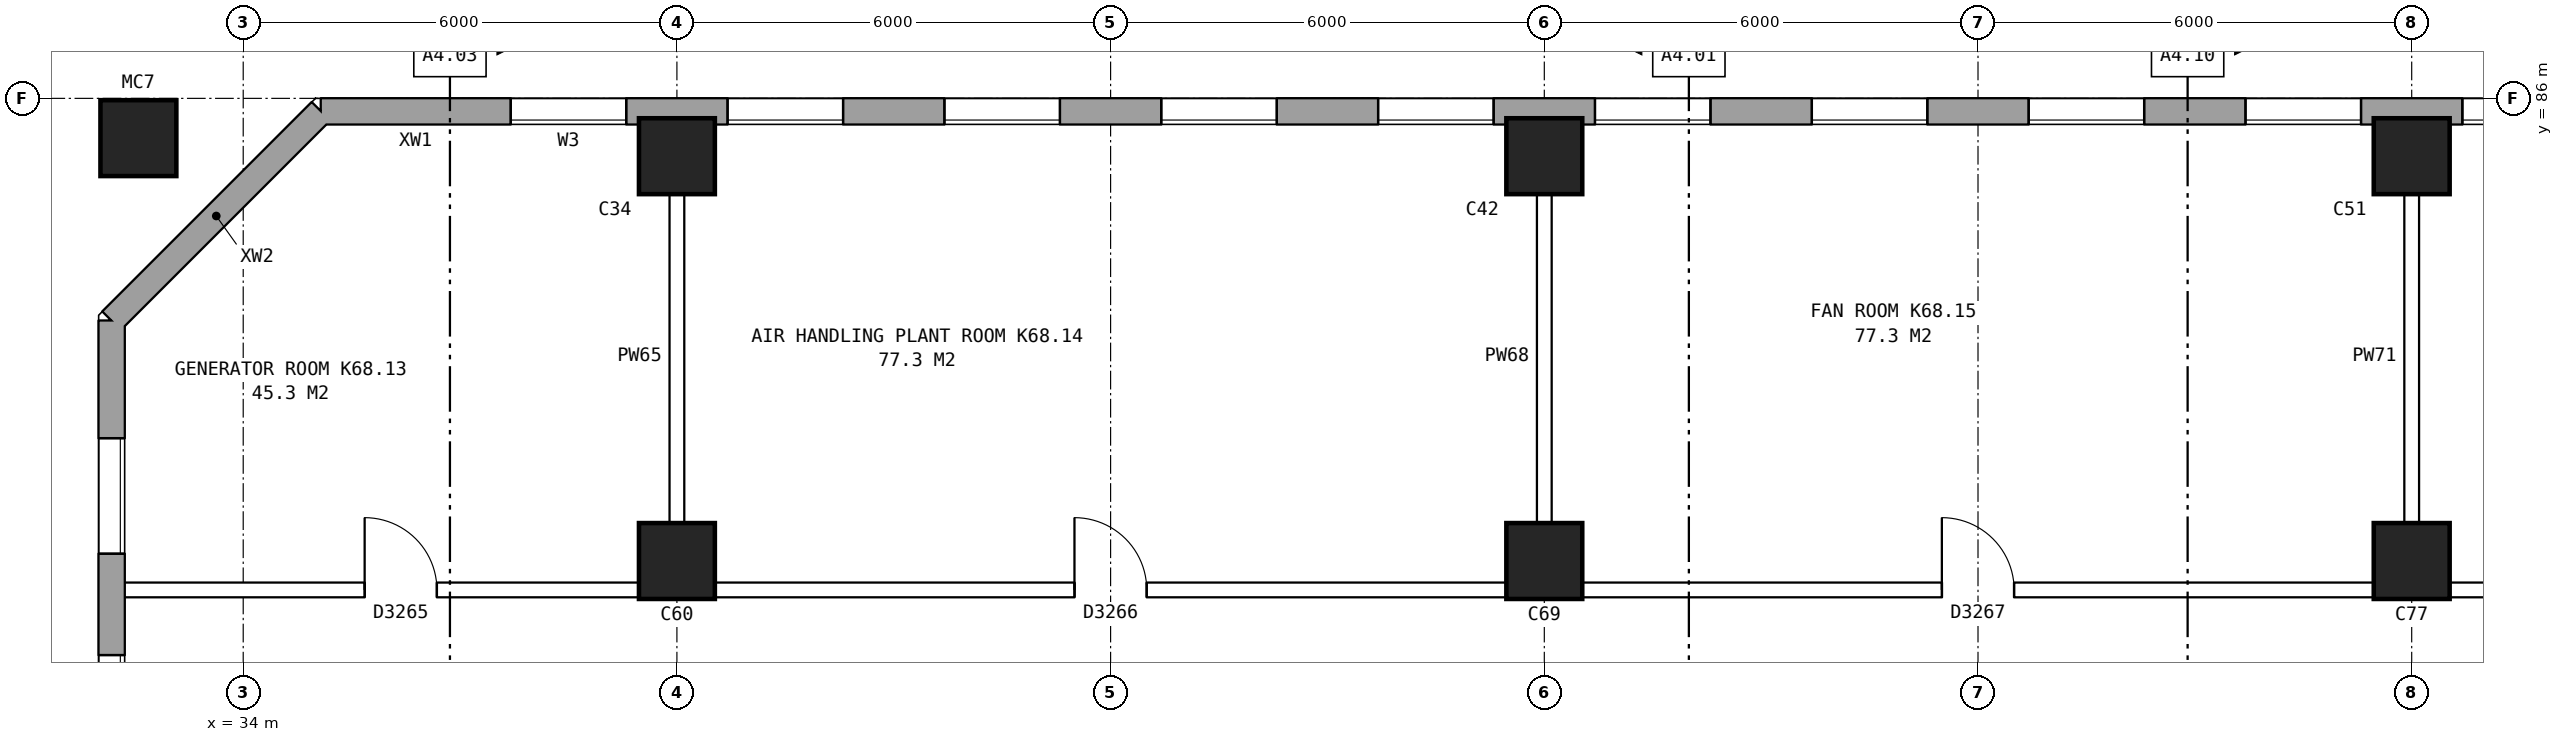
"""IFC4 building model, lengths in metres.
Left out: names, types, materials, properties, quantities, classifications, styles, units other than length and angle.
Written with IfcOpenShell. Run it as: python <this file> out.ifc"""

import sys

from ifc_helpers import new_model, si_unit, direction, frame, frame_2d, origin, origin_2d, place, context, subcontext, project, spatial, polyline, rectangle, hollow_rectangle, outline, extrude, element, fill, save


model = new_model("IFC4")
c1 = context("Model", 3, precision=1e-05, world=origin(), true_north=direction((0.0, 1.0)))
c2 = subcontext(c1, "Body", "Model", "MODEL_VIEW")
j1 = project(units=[si_unit("LENGTHUNIT", "METRE"), si_unit("PLANEANGLEUNIT", "RADIAN")], contexts=[c1])
p1 = place(None, origin())
s1 = spatial("IfcSite", under=j1, at=p1, CompositionType="ELEMENT")
p2 = place(p1, origin())
s2 = spatial("IfcBuilding", under=s1, at=p2, CompositionType="ELEMENT")
p3 = place(p2, frame((0.0, 0.0, 243.9)))
s3 = spatial("IfcBuildingStorey", under=s2, at=p3, CompositionType="ELEMENT", Elevation=243.9)
p4 = place(p3, frame((40.0, 79.6, 0.0), z_axis=(0.0, 0.0, 1.0), x_axis=(1.0, 0.0, 0.0)))
e1 = element("IfcColumn", 1, at=p4, inside=s3, PredefinedType="COLUMN", context=c2, shape_type="SweptSolid", body=[
    extrude(rectangle(XDim=1.05, YDim=1.05, at=origin_2d()), origin(), (0.0, 0.0, 1.0), 15.563),
])
p5 = place(p3, frame((40.0, 85.2, 0.0), z_axis=(0.0, 0.0, 1.0), x_axis=(1.0, 0.0, 0.0)))
e2 = element("IfcColumn", 2, at=p5, inside=s3, PredefinedType="COLUMN", context=c2, shape_type="SweptSolid", body=[
    extrude(rectangle(XDim=1.05, YDim=1.05, at=origin_2d()), origin(), (0.0, 0.0, 1.0), 18.363),
])
p6 = place(p3, frame((52.0, 79.6, 0.0), z_axis=(0.0, 0.0, 1.0), x_axis=(1.0, 0.0, 0.0)))
e3 = element("IfcColumn", 3, at=p6, inside=s3, PredefinedType="COLUMN", context=c2, shape_type="SweptSolid", body=[
    extrude(rectangle(XDim=1.05, YDim=1.05, at=origin_2d()), origin(), (0.0, 0.0, 1.0), 15.563),
])
p7 = place(p3, frame((52.0, 85.2, 0.0), z_axis=(0.0, 0.0, 1.0), x_axis=(1.0, 0.0, 0.0)))
e4 = element("IfcColumn", 4, at=p7, inside=s3, PredefinedType="COLUMN", context=c2, shape_type="SweptSolid", body=[
    extrude(rectangle(XDim=1.05, YDim=1.05, at=origin_2d()), origin(), (0.0, 0.0, 1.0), 18.363),
])
p8 = place(p3, frame((64.0, 79.6, 0.0), z_axis=(0.0, 0.0, 1.0), x_axis=(1.0, 0.0, 0.0)))
e5 = element("IfcColumn", 5, at=p8, inside=s3, PredefinedType="COLUMN", context=c2, shape_type="SweptSolid", body=[
    extrude(rectangle(XDim=1.05, YDim=1.05, at=origin_2d()), origin(), (0.0, 0.0, 1.0), 15.563),
])
p9 = place(p3, frame((64.0, 85.2, 0.0), z_axis=(0.0, 0.0, 1.0), x_axis=(1.0, 0.0, 0.0)))
e6 = element("IfcColumn", 6, at=p9, inside=s3, PredefinedType="COLUMN", context=c2, shape_type="SweptSolid", body=[
    extrude(rectangle(XDim=1.05, YDim=1.05, at=origin_2d()), origin(), (0.0, 0.0, 1.0), 18.363),
])
p10 = place(p3, frame((32.55, 85.45, 0.0), z_axis=(0.0, 0.0, 1.0), x_axis=(1.0, 0.0, 0.0)))
e7 = element("IfcColumn", 7, at=p10, inside=s3, PredefinedType="COLUMN", context=c2, shape_type="SweptSolid", body=[
    extrude(hollow_rectangle(XDim=1.05, YDim=1.05, WallThickness=0.053, at=origin_2d()), origin(), (0.0, 0.0, 1.0), 18.488),
])
p11 = place(p3, frame((74.925, 85.82, 0.0), z_axis=(0.0, 0.0, 1.0), x_axis=(-1.0, 0.0, 0.0)))
e8 = element("IfcWall", 8, at=p11, inside=s3, PredefinedType="STANDARD", context=c2, shape_type="SweptSolid", body=[
    extrude(rectangle(XDim=39.851, YDim=0.36, at=frame_2d((19.925, 0.0))), origin(), (0.0, 0.0, 1.0), 19.21),
])
p12 = place(p11, frame((35.625, 0.0, 1.5)))
e9 = element("IfcOpeningElement", 9, at=p12, cuts=e8, PredefinedType="OPENING", context=c2, shape_type="SweptSolid", body=[
    extrude(rectangle(XDim=1.6, YDim=1.2, at=frame_2d((0.8, 0.6))), frame((0.0, 0.19, 0.0), z_axis=(0.0, -1.0, 0.0), x_axis=(1.0, 0.0, 0.0)), (0.0, 0.0, 1.0), 0.38),
])
p13 = place(p11, frame((32.625, 0.0, 1.5)))
e10 = element("IfcOpeningElement", 10, at=p13, cuts=e8, PredefinedType="OPENING", context=c2, shape_type="SweptSolid", body=[
    extrude(rectangle(XDim=1.6, YDim=1.2, at=frame_2d((0.8, 0.6))), frame((0.0, 0.19, 0.0), z_axis=(0.0, -1.0, 0.0), x_axis=(1.0, 0.0, 0.0)), (0.0, 0.0, 1.0), 0.38),
])
p14 = place(p11, frame((29.625, 0.0, 1.5)))
e11 = element("IfcOpeningElement", 11, at=p14, cuts=e8, PredefinedType="OPENING", context=c2, shape_type="SweptSolid", body=[
    extrude(rectangle(XDim=1.6, YDim=1.2, at=frame_2d((0.8, 0.6))), frame((0.0, 0.19, 0.0), z_axis=(0.0, -1.0, 0.0), x_axis=(1.0, 0.0, 0.0)), (0.0, 0.0, 1.0), 0.38),
])
p15 = place(p11, frame((26.625, 0.0, 1.5)))
e12 = element("IfcOpeningElement", 12, at=p15, cuts=e8, PredefinedType="OPENING", context=c2, shape_type="SweptSolid", body=[
    extrude(rectangle(XDim=1.6, YDim=1.2, at=frame_2d((0.8, 0.6))), frame((0.0, 0.19, 0.0), z_axis=(0.0, -1.0, 0.0), x_axis=(1.0, 0.0, 0.0)), (0.0, 0.0, 1.0), 0.38),
])
p16 = place(p11, frame((23.625, 0.0, 1.5)))
e13 = element("IfcOpeningElement", 13, at=p16, cuts=e8, PredefinedType="OPENING", context=c2, shape_type="SweptSolid", body=[
    extrude(rectangle(XDim=1.6, YDim=1.2, at=frame_2d((0.8, 0.6))), frame((0.0, 0.19, 0.0), z_axis=(0.0, -1.0, 0.0), x_axis=(1.0, 0.0, 0.0)), (0.0, 0.0, 1.0), 0.38),
])
p17 = place(p11, frame((20.625, 0.0, 1.5)))
e14 = element("IfcOpeningElement", 14, at=p17, cuts=e8, PredefinedType="OPENING", context=c2, shape_type="SweptSolid", body=[
    extrude(rectangle(XDim=1.6, YDim=1.2, at=frame_2d((0.8, 0.6))), frame((0.0, 0.19, 0.0), z_axis=(0.0, -1.0, 0.0), x_axis=(1.0, 0.0, 0.0)), (0.0, 0.0, 1.0), 0.38),
])
p18 = place(p11, frame((17.625, 0.0, 1.5)))
e15 = element("IfcOpeningElement", 15, at=p18, cuts=e8, PredefinedType="OPENING", context=c2, shape_type="SweptSolid", body=[
    extrude(rectangle(XDim=1.6, YDim=1.2, at=frame_2d((0.8, 0.6))), frame((0.0, 0.19, 0.0), z_axis=(0.0, -1.0, 0.0), x_axis=(1.0, 0.0, 0.0)), (0.0, 0.0, 1.0), 0.38),
])
p19 = place(p11, frame((14.625, 0.0, 1.5)))
e16 = element("IfcOpeningElement", 16, at=p19, cuts=e8, PredefinedType="OPENING", context=c2, shape_type="SweptSolid", body=[
    extrude(rectangle(XDim=1.6, YDim=1.2, at=frame_2d((0.8, 0.6))), frame((0.0, 0.19, 0.0), z_axis=(0.0, -1.0, 0.0), x_axis=(1.0, 0.0, 0.0)), (0.0, 0.0, 1.0), 0.38),
])
p20 = place(p11, frame((11.625, 0.0, 1.5)))
e17 = element("IfcOpeningElement", 17, at=p20, cuts=e8, PredefinedType="OPENING", context=c2, shape_type="SweptSolid", body=[
    extrude(rectangle(XDim=1.6, YDim=1.2, at=frame_2d((0.8, 0.6))), frame((0.0, 0.19, 0.0), z_axis=(0.0, -1.0, 0.0), x_axis=(1.0, 0.0, 0.0)), (0.0, 0.0, 1.0), 0.38),
])
p21 = place(p11, frame((8.625, 0.0, 1.5)))
e18 = element("IfcOpeningElement", 18, at=p21, cuts=e8, PredefinedType="OPENING", context=c2, shape_type="SweptSolid", body=[
    extrude(rectangle(XDim=1.6, YDim=1.2, at=frame_2d((0.8, 0.6))), frame((0.0, 0.19, 0.0), z_axis=(0.0, -1.0, 0.0), x_axis=(1.0, 0.0, 0.0)), (0.0, 0.0, 1.0), 0.38),
])
p22 = place(p11, frame((5.625, 0.0, 1.5)))
e19 = element("IfcOpeningElement", 19, at=p22, cuts=e8, PredefinedType="OPENING", context=c2, shape_type="SweptSolid", body=[
    extrude(rectangle(XDim=1.6, YDim=1.2, at=frame_2d((0.8, 0.6))), frame((0.0, 0.19, 0.0), z_axis=(0.0, -1.0, 0.0), x_axis=(1.0, 0.0, 0.0)), (0.0, 0.0, 1.0), 0.38),
])
p23 = place(p11, frame((2.625, 0.0, 1.5)))
e20 = element("IfcOpeningElement", 20, at=p23, cuts=e8, PredefinedType="OPENING", context=c2, shape_type="SweptSolid", body=[
    extrude(rectangle(XDim=1.6, YDim=1.2, at=frame_2d((0.8, 0.6))), frame((0.0, 0.19, 0.0), z_axis=(0.0, -1.0, 0.0), x_axis=(1.0, 0.0, 0.0)), (0.0, 0.0, 1.0), 0.38),
])
p24 = place(p3, frame((35.075, 85.82, 0.0), z_axis=(0.0, 0.0, 1.0), x_axis=(-0.707106781187, -0.707106781187, 0.0)))
e21 = element("IfcWall", 21, at=p24, inside=s3, PredefinedType="STANDARD", context=c2, shape_type="SweptSolid", body=[
    extrude(outline(polyline([(0.0, 0.0), (4.094, 0.0), (4.094, 17.763), (0.0, 19.21), (0.0, 0.0)])), frame((0.0, 0.18, 0.0), z_axis=(0.0, -1.0, 0.0), x_axis=(1.0, 0.0, 0.0)), (0.0, 0.0, 1.0), 0.36),
])
p25 = place(p3, frame((32.18, 82.925, 0.0), z_axis=(0.0, 0.0, 1.0), x_axis=(0.0, -1.0, 0.0)))
e22 = element("IfcWall", 22, at=p25, inside=s3, PredefinedType="STANDARD", context=c2, shape_type="SweptSolid", body=[
    extrude(outline(polyline([(0.0, 0.0), (25.851, 0.0), (25.851, 4.837), (0.0, 17.763), (0.0, 0.0)])), frame((0.0, 0.18, 0.0), z_axis=(0.0, -1.0, 0.0), x_axis=(1.0, 0.0, 0.0)), (0.0, 0.0, 1.0), 0.36),
])
p26 = place(p25, frame((22.625, 0.0, 1.5)))
e23 = element("IfcOpeningElement", 23, at=p26, cuts=e22, PredefinedType="OPENING", context=c2, shape_type="SweptSolid", body=[
    extrude(rectangle(XDim=1.6, YDim=1.2, at=frame_2d((0.8, 0.6))), frame((0.0, 0.19, 0.0), z_axis=(0.0, -1.0, 0.0), x_axis=(1.0, 0.0, 0.0)), (0.0, 0.0, 1.0), 0.38),
])
p27 = place(p25, frame((19.625, 0.0, 1.5)))
e24 = element("IfcOpeningElement", 24, at=p27, cuts=e22, PredefinedType="OPENING", context=c2, shape_type="SweptSolid", body=[
    extrude(rectangle(XDim=1.6, YDim=1.2, at=frame_2d((0.8, 0.6))), frame((0.0, 0.19, 0.0), z_axis=(0.0, -1.0, 0.0), x_axis=(1.0, 0.0, 0.0)), (0.0, 0.0, 1.0), 0.38),
])
p28 = place(p25, frame((4.625, 0.0, 1.5)))
e25 = element("IfcOpeningElement", 25, at=p28, cuts=e22, PredefinedType="OPENING", context=c2, shape_type="SweptSolid", body=[
    extrude(rectangle(XDim=1.6, YDim=1.2, at=frame_2d((0.8, 0.6))), frame((0.0, 0.19, 0.0), z_axis=(0.0, -1.0, 0.0), x_axis=(1.0, 0.0, 0.0)), (0.0, 0.0, 1.0), 0.38),
])
p29 = place(p25, frame((1.625, 0.0, 1.5)))
e26 = element("IfcOpeningElement", 26, at=p29, cuts=e22, PredefinedType="OPENING", context=c2, shape_type="SweptSolid", body=[
    extrude(rectangle(XDim=1.6, YDim=1.2, at=frame_2d((0.8, 0.6))), frame((0.0, 0.19, 0.0), z_axis=(0.0, -1.0, 0.0), x_axis=(1.0, 0.0, 0.0)), (0.0, 0.0, 1.0), 0.38),
])
p30 = place(p3, frame((32.24, 79.2, 0.0), z_axis=(0.0, 0.0, 1.0), x_axis=(1.0, 0.0, 0.0)))
e27 = element("IfcWall", 27, at=p30, inside=s3, PredefinedType="PARTITIONING", context=c2, shape_type="SweptSolid", body=[
    extrude(rectangle(XDim=136.52, YDim=0.2, at=frame_2d((68.26, 0.0))), origin(), (0.0, 0.0, 1.0), 3.3),
])
p31 = place(p30, frame((3.44, 0.0, 0.0)))
e28 = element("IfcOpeningElement", 28, at=p31, cuts=e27, PredefinedType="OPENING", context=c2, shape_type="SweptSolid", body=[
    extrude(rectangle(XDim=1.0, YDim=2.1, at=frame_2d((0.5, 1.05))), frame((0.0, 0.11, 0.0), z_axis=(0.0, -1.0, 0.0), x_axis=(1.0, 0.0, 0.0)), (0.0, 0.0, 1.0), 0.22),
])
p32 = place(p30, frame((13.26, 0.0, 0.0)))
e29 = element("IfcOpeningElement", 29, at=p32, cuts=e27, PredefinedType="OPENING", context=c2, shape_type="SweptSolid", body=[
    extrude(rectangle(XDim=1.0, YDim=2.1, at=frame_2d((0.5, 1.05))), frame((0.0, 0.11, 0.0), z_axis=(0.0, -1.0, 0.0), x_axis=(1.0, 0.0, 0.0)), (0.0, 0.0, 1.0), 0.22),
])
p33 = place(p30, frame((25.26, 0.0, 0.0)))
e30 = element("IfcOpeningElement", 30, at=p33, cuts=e27, PredefinedType="OPENING", context=c2, shape_type="SweptSolid", body=[
    extrude(rectangle(XDim=1.0, YDim=2.1, at=frame_2d((0.5, 1.05))), frame((0.0, 0.11, 0.0), z_axis=(0.0, -1.0, 0.0), x_axis=(1.0, 0.0, 0.0)), (0.0, 0.0, 1.0), 0.22),
])
p34 = place(p30, frame((37.08, 0.0, 0.0)))
e31 = element("IfcOpeningElement", 31, at=p34, cuts=e27, PredefinedType="OPENING", context=c2, shape_type="SweptSolid", body=[
    extrude(rectangle(XDim=1.0, YDim=2.1, at=frame_2d((0.5, 1.05))), frame((0.0, 0.11, 0.0), z_axis=(0.0, -1.0, 0.0), x_axis=(1.0, 0.0, 0.0)), (0.0, 0.0, 1.0), 0.22),
])
p35 = place(p30, frame((49.955, 0.0, 0.0)))
e32 = element("IfcOpeningElement", 32, at=p35, cuts=e27, PredefinedType="OPENING", context=c2, shape_type="SweptSolid", body=[
    extrude(rectangle(XDim=1.0, YDim=2.1, at=frame_2d((0.5, 1.05))), frame((0.0, 0.11, 0.0), z_axis=(0.0, -1.0, 0.0), x_axis=(1.0, 0.0, 0.0)), (0.0, 0.0, 1.0), 0.22),
])
p36 = place(p30, frame((67.322, 0.0, 0.0)))
e33 = element("IfcOpeningElement", 33, at=p36, cuts=e27, PredefinedType="OPENING", context=c2, shape_type="SweptSolid", body=[
    extrude(rectangle(XDim=1.0, YDim=2.1, at=frame_2d((0.5, 1.05))), frame((0.0, 0.11, 0.0), z_axis=(0.0, -1.0, 0.0), x_axis=(1.0, 0.0, 0.0)), (0.0, 0.0, 1.0), 0.22),
])
p37 = place(p30, frame((84.51, 0.0, 0.0)))
e34 = element("IfcOpeningElement", 34, at=p37, cuts=e27, PredefinedType="OPENING", context=c2, shape_type="SweptSolid", body=[
    extrude(rectangle(XDim=1.0, YDim=2.1, at=frame_2d((0.5, 1.05))), frame((0.0, 0.11, 0.0), z_axis=(0.0, -1.0, 0.0), x_axis=(1.0, 0.0, 0.0)), (0.0, 0.0, 1.0), 0.22),
])
p38 = place(p30, frame((95.003, 0.0, 0.0)))
e35 = element("IfcOpeningElement", 35, at=p38, cuts=e27, PredefinedType="OPENING", context=c2, shape_type="SweptSolid", body=[
    extrude(rectangle(XDim=1.0, YDim=2.1, at=frame_2d((0.5, 1.05))), frame((0.0, 0.11, 0.0), z_axis=(0.0, -1.0, 0.0), x_axis=(1.0, 0.0, 0.0)), (0.0, 0.0, 1.0), 0.22),
])
p39 = place(p30, frame((104.44, 0.0, 0.0)))
e36 = element("IfcOpeningElement", 36, at=p39, cuts=e27, PredefinedType="OPENING", context=c2, shape_type="SweptSolid", body=[
    extrude(rectangle(XDim=1.0, YDim=2.1, at=frame_2d((0.5, 1.05))), frame((0.0, 0.11, 0.0), z_axis=(0.0, -1.0, 0.0), x_axis=(1.0, 0.0, 0.0)), (0.0, 0.0, 1.0), 0.22),
])
p40 = place(p30, frame((123.48, 0.0, 0.0)))
e37 = element("IfcOpeningElement", 37, at=p40, cuts=e27, PredefinedType="OPENING", context=c2, shape_type="SweptSolid", body=[
    extrude(rectangle(XDim=1.0, YDim=2.1, at=frame_2d((0.5, 1.05))), frame((0.0, 0.11, 0.0), z_axis=(0.0, -1.0, 0.0), x_axis=(1.0, 0.0, 0.0)), (0.0, 0.0, 1.0), 0.22),
])
for number, where, z_axis, x_axis in (
    (38, (40.0, 79.1, 0.0), (0.0, 0.0, 1.0), (0.0, 1.0, 0.0)),
    (39, (52.0, 79.1, 0.0), (0.0, 0.0, 1.0), (0.0, 1.0, 0.0)),
    (40, (64.0, 79.1, 0.0), (0.0, 0.0, 1.0), (0.0, 1.0, 0.0)),
):
    element("IfcWall", number, at=place(p3, frame(where, z_axis=z_axis, x_axis=x_axis)), inside=s3, PredefinedType="PARTITIONING", context=c2, shape_type="SweptSolid", body=[
        extrude(rectangle(XDim=6.66, YDim=0.2, at=frame_2d((3.33, 0.0))), origin(), (0.0, 0.0, 1.0), 3.3),
    ])
p41 = place(p12, origin())
e41 = element("IfcWindow", 41, at=p41, inside=s3, PartitioningType="DOUBLE_PANEL_HORIZONTAL", PredefinedType="WINDOW", context=c2, shape_type="SweptSolid", body=[
    extrude(rectangle(XDim=1.6, YDim=1.2, at=frame_2d((0.8, 0.6))), frame((0.0, 0.15, 0.0), z_axis=(0.0, -1.0, 0.0), x_axis=(1.0, 0.0, 0.0)), (0.0, 0.0, 1.0), 0.06),
])
fill(e9, e41)
p42 = place(p13, origin())
e42 = element("IfcWindow", 42, at=p42, inside=s3, PartitioningType="DOUBLE_PANEL_HORIZONTAL", PredefinedType="WINDOW", context=c2, shape_type="SweptSolid", body=[
    extrude(rectangle(XDim=1.6, YDim=1.2, at=frame_2d((0.8, 0.6))), frame((0.0, 0.15, 0.0), z_axis=(0.0, -1.0, 0.0), x_axis=(1.0, 0.0, 0.0)), (0.0, 0.0, 1.0), 0.06),
])
fill(e10, e42)
p43 = place(p14, origin())
e43 = element("IfcWindow", 43, at=p43, inside=s3, PartitioningType="DOUBLE_PANEL_HORIZONTAL", PredefinedType="WINDOW", context=c2, shape_type="SweptSolid", body=[
    extrude(rectangle(XDim=1.6, YDim=1.2, at=frame_2d((0.8, 0.6))), frame((0.0, 0.15, 0.0), z_axis=(0.0, -1.0, 0.0), x_axis=(1.0, 0.0, 0.0)), (0.0, 0.0, 1.0), 0.06),
])
fill(e11, e43)
p44 = place(p15, origin())
e44 = element("IfcWindow", 44, at=p44, inside=s3, PartitioningType="DOUBLE_PANEL_HORIZONTAL", PredefinedType="WINDOW", context=c2, shape_type="SweptSolid", body=[
    extrude(rectangle(XDim=1.6, YDim=1.2, at=frame_2d((0.8, 0.6))), frame((0.0, 0.15, 0.0), z_axis=(0.0, -1.0, 0.0), x_axis=(1.0, 0.0, 0.0)), (0.0, 0.0, 1.0), 0.06),
])
fill(e12, e44)
p45 = place(p16, origin())
e45 = element("IfcWindow", 45, at=p45, inside=s3, PartitioningType="DOUBLE_PANEL_HORIZONTAL", PredefinedType="WINDOW", context=c2, shape_type="SweptSolid", body=[
    extrude(rectangle(XDim=1.6, YDim=1.2, at=frame_2d((0.8, 0.6))), frame((0.0, 0.15, 0.0), z_axis=(0.0, -1.0, 0.0), x_axis=(1.0, 0.0, 0.0)), (0.0, 0.0, 1.0), 0.06),
])
fill(e13, e45)
p46 = place(p17, origin())
e46 = element("IfcWindow", 46, at=p46, inside=s3, PartitioningType="DOUBLE_PANEL_HORIZONTAL", PredefinedType="WINDOW", context=c2, shape_type="SweptSolid", body=[
    extrude(rectangle(XDim=1.6, YDim=1.2, at=frame_2d((0.8, 0.6))), frame((0.0, 0.15, 0.0), z_axis=(0.0, -1.0, 0.0), x_axis=(1.0, 0.0, 0.0)), (0.0, 0.0, 1.0), 0.06),
])
fill(e14, e46)
p47 = place(p18, origin())
e47 = element("IfcWindow", 47, at=p47, inside=s3, PartitioningType="DOUBLE_PANEL_HORIZONTAL", PredefinedType="WINDOW", context=c2, shape_type="SweptSolid", body=[
    extrude(rectangle(XDim=1.6, YDim=1.2, at=frame_2d((0.8, 0.6))), frame((0.0, 0.15, 0.0), z_axis=(0.0, -1.0, 0.0), x_axis=(1.0, 0.0, 0.0)), (0.0, 0.0, 1.0), 0.06),
])
fill(e15, e47)
p48 = place(p19, origin())
e48 = element("IfcWindow", 48, at=p48, inside=s3, PartitioningType="DOUBLE_PANEL_HORIZONTAL", PredefinedType="WINDOW", context=c2, shape_type="SweptSolid", body=[
    extrude(rectangle(XDim=1.6, YDim=1.2, at=frame_2d((0.8, 0.6))), frame((0.0, 0.15, 0.0), z_axis=(0.0, -1.0, 0.0), x_axis=(1.0, 0.0, 0.0)), (0.0, 0.0, 1.0), 0.06),
])
fill(e16, e48)
p49 = place(p20, origin())
e49 = element("IfcWindow", 49, at=p49, inside=s3, PartitioningType="DOUBLE_PANEL_HORIZONTAL", PredefinedType="WINDOW", context=c2, shape_type="SweptSolid", body=[
    extrude(rectangle(XDim=1.6, YDim=1.2, at=frame_2d((0.8, 0.6))), frame((0.0, 0.15, 0.0), z_axis=(0.0, -1.0, 0.0), x_axis=(1.0, 0.0, 0.0)), (0.0, 0.0, 1.0), 0.06),
])
fill(e17, e49)
p50 = place(p21, origin())
e50 = element("IfcWindow", 50, at=p50, inside=s3, PartitioningType="DOUBLE_PANEL_HORIZONTAL", PredefinedType="WINDOW", context=c2, shape_type="SweptSolid", body=[
    extrude(rectangle(XDim=1.6, YDim=1.2, at=frame_2d((0.8, 0.6))), frame((0.0, 0.15, 0.0), z_axis=(0.0, -1.0, 0.0), x_axis=(1.0, 0.0, 0.0)), (0.0, 0.0, 1.0), 0.06),
])
fill(e18, e50)
p51 = place(p28, origin())
e51 = element("IfcWindow", 51, at=p51, inside=s3, PartitioningType="DOUBLE_PANEL_HORIZONTAL", PredefinedType="WINDOW", context=c2, shape_type="SweptSolid", body=[
    extrude(rectangle(XDim=1.6, YDim=1.2, at=frame_2d((0.8, 0.6))), frame((0.0, 0.15, 0.0), z_axis=(0.0, -1.0, 0.0), x_axis=(1.0, 0.0, 0.0)), (0.0, 0.0, 1.0), 0.06),
])
fill(e25, e51)
p52 = place(p29, origin())
e52 = element("IfcWindow", 52, at=p52, inside=s3, PartitioningType="DOUBLE_PANEL_HORIZONTAL", PredefinedType="WINDOW", context=c2, shape_type="SweptSolid", body=[
    extrude(rectangle(XDim=1.6, YDim=1.2, at=frame_2d((0.8, 0.6))), frame((0.0, 0.15, 0.0), z_axis=(0.0, -1.0, 0.0), x_axis=(1.0, 0.0, 0.0)), (0.0, 0.0, 1.0), 0.06),
])
fill(e26, e52)
p53 = place(p31, origin())
e53 = element("IfcDoor", 53, at=p53, inside=s3, OperationType="SINGLE_SWING_LEFT", PredefinedType="DOOR", context=c2, shape_type="SweptSolid", body=[
    extrude(rectangle(XDim=1.0, YDim=2.1, at=frame_2d((0.5, 1.05))), frame((0.0, 0.025, 0.0), z_axis=(0.0, -1.0, 0.0), x_axis=(1.0, 0.0, 0.0)), (0.0, 0.0, 1.0), 0.05),
])
fill(e28, e53)
p54 = place(p32, origin())
e54 = element("IfcDoor", 54, at=p54, inside=s3, OperationType="SINGLE_SWING_LEFT", PredefinedType="DOOR", context=c2, shape_type="SweptSolid", body=[
    extrude(rectangle(XDim=1.0, YDim=2.1, at=frame_2d((0.5, 1.05))), frame((0.0, 0.025, 0.0), z_axis=(0.0, -1.0, 0.0), x_axis=(1.0, 0.0, 0.0)), (0.0, 0.0, 1.0), 0.05),
])
fill(e29, e54)
p55 = place(p33, origin())
e55 = element("IfcDoor", 55, at=p55, inside=s3, OperationType="SINGLE_SWING_LEFT", PredefinedType="DOOR", context=c2, shape_type="SweptSolid", body=[
    extrude(rectangle(XDim=1.0, YDim=2.1, at=frame_2d((0.5, 1.05))), frame((0.0, 0.025, 0.0), z_axis=(0.0, -1.0, 0.0), x_axis=(1.0, 0.0, 0.0)), (0.0, 0.0, 1.0), 0.05),
])
fill(e30, e55)
save(model, sys.argv[1])
